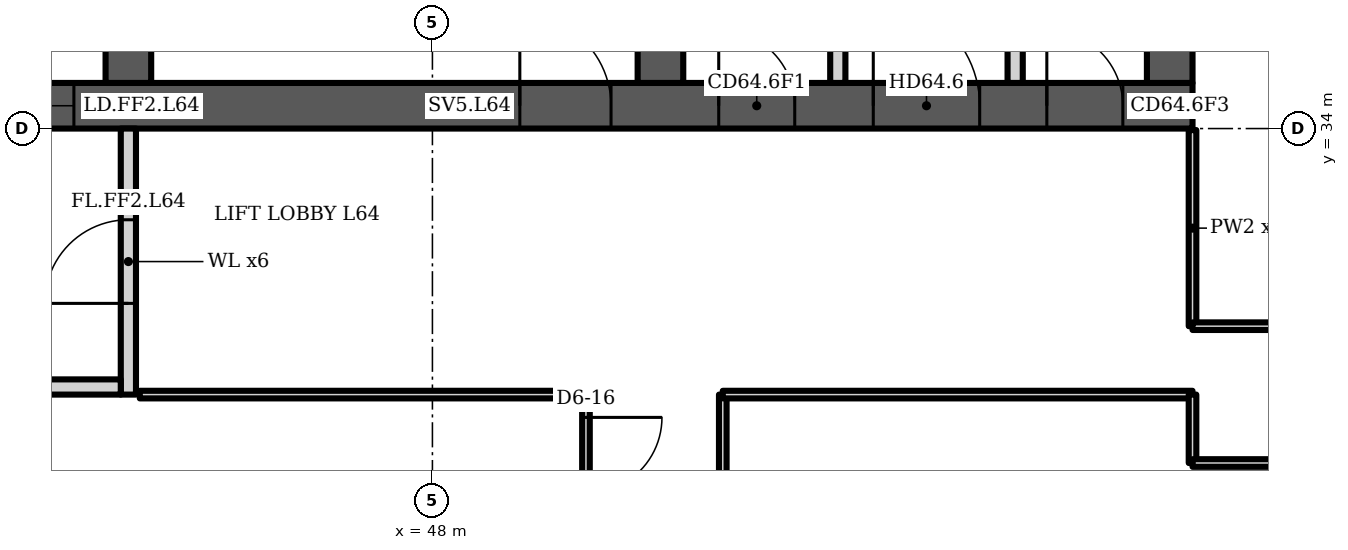
"""IFC4 building model, lengths in metres.
Left out: names, types, materials, properties, quantities, classifications, styles, units other than length and angle.
Written with IfcOpenShell. Run it as: python <this file> out.ifc"""

import sys

from ifc_helpers import new_model, si_unit, direction, frame, frame_2d, origin, place, context, subcontext, project, spatial, polyline, rectangle, outline, extrude, element, fill, save


model = new_model("IFC4")
c1 = context("Model", 3, precision=1e-05, world=origin(), true_north=direction((0.0, 1.0)))
c2 = subcontext(c1, "Body", "Model", "MODEL_VIEW")
j1 = project(units=[si_unit("LENGTHUNIT", "METRE"), si_unit("PLANEANGLEUNIT", "RADIAN")], contexts=[c1])
p1 = place(None, origin())
s1 = spatial("IfcSite", under=j1, at=p1, CompositionType="ELEMENT")
p2 = place(p1, origin())
s2 = spatial("IfcBuilding", under=s1, at=p2, CompositionType="ELEMENT")
p3 = place(p2, frame((0.0, 0.0, 253.9)))
s3 = spatial("IfcBuildingStorey", under=s2, at=p3, CompositionType="ELEMENT", Elevation=253.9)
p4 = place(p3, frame((23.0, 34.3, 0.0), z_axis=(0.0, 0.0, 1.0), x_axis=(1.0, 0.0, 0.0)))
e1 = element("IfcWall", 1, at=p4, inside=s3, PredefinedType="SHEAR", context=c2, shape_type="SweptSolid", body=[
    extrude(rectangle(XDim=35.0, YDim=0.6, at=frame_2d((17.5, 0.0))), origin(), (0.0, 0.0, 1.0), 3.6),
])
p5 = place(p4, frame((0.65, 0.0, 0.0)))
e2 = element("IfcOpeningElement", 2, at=p5, cuts=e1, PredefinedType="OPENING", context=c2, shape_type="SweptSolid", body=[
    extrude(rectangle(XDim=1.2, YDim=2.1, at=frame_2d((0.6, 1.05))), frame((0.0, 0.31, 0.0), z_axis=(0.0, -1.0, 0.0), x_axis=(1.0, 0.0, 0.0)), (0.0, 0.0, 1.0), 0.62),
])
p6 = place(p4, frame((7.717, 0.0, 0.0)))
e3 = element("IfcOpeningElement", 3, at=p6, cuts=e1, PredefinedType="OPENING", context=c2, shape_type="SweptSolid", body=[
    extrude(rectangle(XDim=1.1, YDim=2.1, at=frame_2d((0.55, 1.05))), frame((0.0, 0.31, 0.0), z_axis=(0.0, -1.0, 0.0), x_axis=(1.0, 0.0, 0.0)), (0.0, 0.0, 1.0), 0.62),
])
p7 = place(p4, frame((12.183, 0.0, 0.0)))
e4 = element("IfcOpeningElement", 4, at=p7, cuts=e1, PredefinedType="OPENING", context=c2, shape_type="SweptSolid", body=[
    extrude(rectangle(XDim=1.1, YDim=2.1, at=frame_2d((0.55, 1.05))), frame((0.0, 0.31, 0.0), z_axis=(0.0, -1.0, 0.0), x_axis=(1.0, 0.0, 0.0)), (0.0, 0.0, 1.0), 0.62),
])
p8 = place(p4, frame((9.8, 0.0, 0.0)))
e5 = element("IfcOpeningElement", 5, at=p8, cuts=e1, PredefinedType="OPENING", context=c2, shape_type="SweptSolid", body=[
    extrude(rectangle(XDim=1.4, YDim=2.1, at=frame_2d((0.7, 1.05))), frame((0.0, 0.31, 0.0), z_axis=(0.0, -1.0, 0.0), x_axis=(1.0, 0.0, 0.0)), (0.0, 0.0, 1.0), 0.62),
])
p9 = place(p4, frame((14.717, 0.0, 0.0)))
e6 = element("IfcOpeningElement", 6, at=p9, cuts=e1, PredefinedType="OPENING", context=c2, shape_type="SweptSolid", body=[
    extrude(rectangle(XDim=1.1, YDim=2.1, at=frame_2d((0.55, 1.05))), frame((0.0, 0.31, 0.0), z_axis=(0.0, -1.0, 0.0), x_axis=(1.0, 0.0, 0.0)), (0.0, 0.0, 1.0), 0.62),
])
p10 = place(p4, frame((16.95, 0.0, 0.0)))
e7 = element("IfcOpeningElement", 7, at=p10, cuts=e1, PredefinedType="OPENING", context=c2, shape_type="SweptSolid", body=[
    extrude(rectangle(XDim=1.1, YDim=2.1, at=frame_2d((0.55, 1.05))), frame((0.0, 0.31, 0.0), z_axis=(0.0, -1.0, 0.0), x_axis=(1.0, 0.0, 0.0)), (0.0, 0.0, 1.0), 0.62),
])
p11 = place(p4, frame((19.183, 0.0, 0.0)))
e8 = element("IfcOpeningElement", 8, at=p11, cuts=e1, PredefinedType="OPENING", context=c2, shape_type="SweptSolid", body=[
    extrude(rectangle(XDim=1.1, YDim=2.1, at=frame_2d((0.55, 1.05))), frame((0.0, 0.31, 0.0), z_axis=(0.0, -1.0, 0.0), x_axis=(1.0, 0.0, 0.0)), (0.0, 0.0, 1.0), 0.62),
])
p12 = place(p4, frame((26.15, 0.0, 0.0)))
e9 = element("IfcOpeningElement", 9, at=p12, cuts=e1, PredefinedType="OPENING", context=c2, shape_type="SweptSolid", body=[
    extrude(rectangle(XDim=1.2, YDim=2.1, at=frame_2d((0.6, 1.05))), frame((0.0, 0.31, 0.0), z_axis=(0.0, -1.0, 0.0), x_axis=(1.0, 0.0, 0.0)), (0.0, 0.0, 1.0), 0.62),
])
p13 = place(p4, frame((28.767, 0.0, 0.0)))
e10 = element("IfcOpeningElement", 10, at=p13, cuts=e1, PredefinedType="OPENING", context=c2, shape_type="SweptSolid", body=[
    extrude(rectangle(XDim=1.0, YDim=2.1, at=frame_2d((0.5, 1.05))), frame((0.0, 0.31, 0.0), z_axis=(0.0, -1.0, 0.0), x_axis=(1.0, 0.0, 0.0)), (0.0, 0.0, 1.0), 0.62),
])
p14 = place(p4, frame((33.083, 0.0, 0.0)))
e11 = element("IfcOpeningElement", 11, at=p14, cuts=e1, PredefinedType="OPENING", context=c2, shape_type="SweptSolid", body=[
    extrude(rectangle(XDim=1.0, YDim=2.1, at=frame_2d((0.5, 1.05))), frame((0.0, 0.31, 0.0), z_axis=(0.0, -1.0, 0.0), x_axis=(1.0, 0.0, 0.0)), (0.0, 0.0, 1.0), 0.62),
])
p15 = place(p4, frame((30.8, 0.0, 0.0)))
e12 = element("IfcOpeningElement", 12, at=p15, cuts=e1, PredefinedType="OPENING", context=c2, shape_type="SweptSolid", body=[
    extrude(rectangle(XDim=1.4, YDim=2.1, at=frame_2d((0.7, 1.05))), frame((0.0, 0.31, 0.0), z_axis=(0.0, -1.0, 0.0), x_axis=(1.0, 0.0, 0.0)), (0.0, 0.0, 1.0), 0.62),
])
p16 = place(p3, frame((44.0, 34.6, 0.0), z_axis=(0.0, 0.0, 1.0), x_axis=(0.0, 1.0, 0.0)))
e13 = element("IfcWall", 13, at=p16, inside=s3, PredefinedType="SHEAR", context=c2, shape_type="SweptSolid", body=[
    extrude(rectangle(XDim=14.784, YDim=0.6, at=frame_2d((7.392, 0.0))), origin(), (0.0, 0.0, 1.0), 3.6),
])
p17 = place(p16, frame((11.608, 0.0, 0.0)))
e14 = element("IfcOpeningElement", 14, at=p17, cuts=e13, PredefinedType="OPENING", context=c2, shape_type="SweptSolid", body=[
    extrude(rectangle(XDim=1.0, YDim=2.1, at=frame_2d((0.5, 1.05))), frame((0.0, 0.31, 0.0), z_axis=(0.0, -1.0, 0.0), x_axis=(1.0, 0.0, 0.0)), (0.0, 0.0, 1.0), 0.62),
])
p18 = place(p16, frame((3.8, 0.0, 0.0)))
e15 = element("IfcOpeningElement", 15, at=p18, cuts=e13, PredefinedType="OPENING", context=c2, shape_type="SweptSolid", body=[
    extrude(rectangle(XDim=1.1, YDim=2.1, at=frame_2d((0.55, 1.05))), frame((0.0, 0.31, 0.0), z_axis=(0.0, -1.0, 0.0), x_axis=(1.0, 0.0, 0.0)), (0.0, 0.0, 1.0), 0.62),
])
p19 = place(p3, frame((51.0, 34.6, 0.0), z_axis=(0.0, 0.0, 1.0), x_axis=(0.0, 1.0, 0.0)))
e16 = element("IfcWall", 16, at=p19, inside=s3, PredefinedType="SHEAR", context=c2, shape_type="SweptSolid", body=[
    extrude(rectangle(XDim=14.171, YDim=0.6, at=frame_2d((7.085, 0.0))), origin(), (0.0, 0.0, 1.0), 3.6),
])
p20 = place(p19, frame((3.8, 0.0, 0.0)))
e17 = element("IfcOpeningElement", 17, at=p20, cuts=e16, PredefinedType="OPENING", context=c2, shape_type="SweptSolid", body=[
    extrude(rectangle(XDim=1.1, YDim=2.1, at=frame_2d((0.55, 1.05))), frame((0.0, 0.31, 0.0), z_axis=(0.0, -1.0, 0.0), x_axis=(1.0, 0.0, 0.0)), (0.0, 0.0, 1.0), 0.62),
])
p21 = place(p3, frame((57.7, 34.6, 0.0), z_axis=(0.0, 0.0, 1.0), x_axis=(0.0, 1.0, 0.0)))
e18 = element("IfcWall", 18, at=p21, inside=s3, PredefinedType="SHEAR", context=c2, shape_type="SweptSolid", body=[
    extrude(rectangle(XDim=13.585, YDim=0.6, at=frame_2d((6.792, 0.0))), origin(), (0.0, 0.0, 1.0), 3.6),
])
p22 = place(p3, origin())
e19 = element("IfcWall", 19, at=p22, inside=s3, PredefinedType="PARTITIONING", context=c2, shape_type="SweptSolid", body=[
    extrude(outline(polyline([(41.567, 37.1), (39.433, 37.1), (39.433, 34.6), (39.233, 34.6), (39.233, 37.45), (37.3, 37.45), (37.3, 37.65), (39.233, 37.65), (39.433, 37.65), (39.433, 37.3), (41.567, 37.3), (41.567, 37.35), (41.767, 37.35), (43.7, 37.35), (43.7, 37.15), (41.767, 37.15), (41.767, 34.6), (41.567, 34.6), (41.567, 37.1)])), origin(), (0.0, 0.0, 1.0), 3.2),
])
p23 = place(p3, origin())
e20 = element("IfcWall", 20, at=p23, inside=s3, PredefinedType="PARTITIONING", context=c2, shape_type="SweptSolid", body=[
    extrude(outline(polyline([(53.233, 34.6), (53.233, 37.3), (53.433, 37.3), (53.433, 34.6), (53.233, 34.6)])), origin(), (0.0, 0.0, 1.0), 3.2),
])
p24 = place(p3, origin())
e21 = element("IfcWall", 21, at=p24, inside=s3, PredefinedType="PARTITIONING", context=c2, shape_type="SweptSolid", body=[
    extrude(outline(polyline([(55.567, 34.6), (55.567, 37.3), (55.767, 37.3), (55.767, 34.6), (55.567, 34.6)])), origin(), (0.0, 0.0, 1.0), 3.2),
])
p25 = place(p3, frame((44.0, 30.5, 0.0), z_axis=(0.0, 0.0, 1.0), x_axis=(0.0, 1.0, 0.0)))
e22 = element("IfcWall", 22, at=p25, inside=s3, PredefinedType="PARTITIONING", context=c2, shape_type="SweptSolid", body=[
    extrude(rectangle(XDim=3.5, YDim=0.2, at=frame_2d((1.75, 0.0))), origin(), (0.0, 0.0, 1.0), 3.2),
])
p26 = place(p25, frame((1.2, 0.0, 0.0)))
e23 = element("IfcOpeningElement", 23, at=p26, cuts=e22, PredefinedType="OPENING", context=c2, shape_type="SweptSolid", body=[
    extrude(rectangle(XDim=1.1, YDim=2.1, at=frame_2d((0.55, 1.05))), frame((0.0, 0.11, 0.0), z_axis=(0.0, -1.0, 0.0), x_axis=(1.0, 0.0, 0.0)), (0.0, 0.0, 1.0), 0.22),
])
p27 = place(p3, frame((41.1, 30.6, 0.0), z_axis=(0.0, 0.0, 1.0), x_axis=(1.0, 0.0, 0.0)))
e24 = element("IfcWall", 24, at=p27, inside=s3, PredefinedType="PARTITIONING", context=c2, shape_type="SweptSolid", body=[
    extrude(rectangle(XDim=2.8, YDim=0.2, at=frame_2d((1.4, 0.0))), origin(), (0.0, 0.0, 1.0), 3.2),
])
p28 = place(p3, frame((50.02, 15.245, 0.0), z_axis=(0.0, 0.0, 1.0), x_axis=(0.0, 1.0, 0.0)))
e25 = element("IfcWall", 25, at=p28, inside=s3, PredefinedType="PARTITIONING", context=c2, shape_type="SweptSolid", body=[
    extrude(rectangle(XDim=15.255, YDim=0.1, at=frame_2d((7.627, 0.0))), origin(), (0.0, 0.0, 1.0), 3.2),
])
p29 = place(p28, frame((13.955, 0.0, 0.0)))
e26 = element("IfcOpeningElement", 26, at=p29, cuts=e25, PredefinedType="OPENING", context=c2, shape_type="SweptSolid", body=[
    extrude(rectangle(XDim=1.0, YDim=2.1, at=frame_2d((0.5, 1.05))), frame((0.0, 0.06, 0.0), z_axis=(0.0, -1.0, 0.0), x_axis=(1.0, 0.0, 0.0)), (0.0, 0.0, 1.0), 0.12),
])
p30 = place(p3, frame((51.82, 3.717, 0.0), z_axis=(0.0, 0.0, 1.0), x_axis=(0.0, 1.0, 0.0)))
e27 = element("IfcWall", 27, at=p30, inside=s3, PredefinedType="PARTITIONING", context=c2, shape_type="SweptSolid", body=[
    extrude(rectangle(XDim=26.783, YDim=0.1, at=frame_2d((13.391, 0.0))), origin(), (0.0, 0.0, 1.0), 2.58),
])
p31 = place(p30, frame((2.798, 0.0, 0.0)))
e28 = element("IfcOpeningElement", 28, at=p31, cuts=e27, PredefinedType="OPENING", context=c2, shape_type="SweptSolid", body=[
    extrude(rectangle(XDim=1.0, YDim=2.1, at=frame_2d((0.5, 1.05))), frame((0.0, 0.06, 0.0), z_axis=(0.0, -1.0, 0.0), x_axis=(1.0, 0.0, 0.0)), (0.0, 0.0, 1.0), 0.12),
])
p32 = place(p30, frame((9.453, 0.0, 0.0)))
e29 = element("IfcOpeningElement", 29, at=p32, cuts=e27, PredefinedType="OPENING", context=c2, shape_type="SweptSolid", body=[
    extrude(rectangle(XDim=1.0, YDim=2.1, at=frame_2d((0.5, 1.05))), frame((0.0, 0.06, 0.0), z_axis=(0.0, -1.0, 0.0), x_axis=(1.0, 0.0, 0.0)), (0.0, 0.0, 1.0), 0.12),
])
p33 = place(p3, frame((51.82, 30.5, 0.0), z_axis=(0.0, 0.0, 1.0), x_axis=(1.0, 0.0, 0.0)))
e30 = element("IfcWall", 30, at=p33, inside=s3, PredefinedType="PARTITIONING", context=c2, shape_type="SweptSolid", body=[
    extrude(rectangle(XDim=6.18, YDim=0.1, at=frame_2d((3.09, 0.0))), origin(), (0.0, 0.0, 1.0), 3.2),
])
p34 = place(p3, frame((58.0, 29.6, 0.0), z_axis=(0.0, 0.0, 1.0), x_axis=(0.0, 1.0, 0.0)))
e31 = element("IfcWall", 31, at=p34, inside=s3, PredefinedType="PARTITIONING", context=c2, shape_type="SweptSolid", body=[
    extrude(rectangle(XDim=0.9, YDim=0.1, at=frame_2d((0.45, 0.0))), origin(), (0.0, 0.0, 1.0), 3.2),
])
p35 = place(p3, frame((58.0, 29.6, 0.0), z_axis=(0.0, 0.0, 1.0), x_axis=(1.0, 0.0, 0.0)))
e32 = element("IfcWall", 32, at=p35, inside=s3, PredefinedType="PARTITIONING", context=c2, shape_type="SweptSolid", body=[
    extrude(rectangle(XDim=6.17, YDim=0.1, at=frame_2d((3.085, 0.0))), origin(), (0.0, 0.0, 1.0), 3.2),
])
p36 = place(p3, frame((58.0, 31.4, 0.0), z_axis=(0.0, 0.0, 1.0), x_axis=(0.0, 1.0, 0.0)))
e33 = element("IfcWall", 33, at=p36, inside=s3, PredefinedType="PARTITIONING", context=c2, shape_type="SweptSolid", body=[
    extrude(rectangle(XDim=2.58, YDim=0.1, at=frame_2d((1.29, 0.0))), origin(), (0.0, 0.0, 1.0), 3.2),
])
p37 = place(p3, frame((58.0, 31.4, 0.0), z_axis=(0.0, 0.0, 1.0), x_axis=(1.0, 0.0, 0.0)))
e34 = element("IfcWall", 34, at=p37, inside=s3, PredefinedType="PARTITIONING", context=c2, shape_type="SweptSolid", body=[
    extrude(rectangle(XDim=7.97, YDim=0.1, at=frame_2d((3.985, 0.0))), origin(), (0.0, 0.0, 1.0), 3.2),
])
p38 = place(p37, frame((2.15, 0.0, 0.0)))
e35 = element("IfcOpeningElement", 35, at=p38, cuts=e34, PredefinedType="OPENING", context=c2, shape_type="SweptSolid", body=[
    extrude(rectangle(XDim=1.0, YDim=2.1, at=frame_2d((0.5, 1.05))), frame((0.0, 0.06, 0.0), z_axis=(0.0, -1.0, 0.0), x_axis=(1.0, 0.0, 0.0)), (0.0, 0.0, 1.0), 0.12),
])
p39 = place(p3, frame((44.15, 30.5, 0.0), z_axis=(0.0, 0.0, 1.0), x_axis=(1.0, 0.0, 0.0)))
e36 = element("IfcWall", 36, at=p39, inside=s3, PredefinedType="PARTITIONING", context=c2, shape_type="SweptSolid", body=[
    extrude(rectangle(XDim=5.87, YDim=0.1, at=frame_2d((2.935, 0.0))), origin(), (0.0, 0.0, 1.0), 3.2),
])
p40 = place(p11, origin())
e37 = element("IfcDoor", 37, at=p40, inside=s3, OperationType="DOUBLE_DOOR_SLIDING", PredefinedType="DOOR", context=c2, shape_type="SweptSolid", body=[
    extrude(rectangle(XDim=1.1, YDim=2.1, at=frame_2d((0.55, 1.05))), frame((0.0, 0.025, 0.0), z_axis=(0.0, -1.0, 0.0), x_axis=(1.0, 0.0, 0.0)), (0.0, 0.0, 1.0), 0.05),
])
fill(e8, e37)
p41 = place(p12, origin())
e38 = element("IfcDoor", 38, at=p41, inside=s3, OperationType="SINGLE_SWING_LEFT", PredefinedType="DOOR", context=c2, shape_type="SweptSolid", body=[
    extrude(rectangle(XDim=1.2, YDim=2.1, at=frame_2d((0.6, 1.05))), frame((0.0, 0.025, 0.0), z_axis=(0.0, -1.0, 0.0), x_axis=(1.0, 0.0, 0.0)), (0.0, 0.0, 1.0), 0.05),
])
fill(e9, e38)
p42 = place(p13, origin())
e39 = element("IfcDoor", 39, at=p42, inside=s3, OperationType="SINGLE_SWING_LEFT", PredefinedType="DOOR", context=c2, shape_type="SweptSolid", body=[
    extrude(rectangle(XDim=1.0, YDim=2.1, at=frame_2d((0.5, 1.05))), frame((0.0, 0.025, 0.0), z_axis=(0.0, -1.0, 0.0), x_axis=(1.0, 0.0, 0.0)), (0.0, 0.0, 1.0), 0.05),
])
fill(e10, e39)
p43 = place(p14, origin())
e40 = element("IfcDoor", 40, at=p43, inside=s3, OperationType="SINGLE_SWING_LEFT", PredefinedType="DOOR", context=c2, shape_type="SweptSolid", body=[
    extrude(rectangle(XDim=1.0, YDim=2.1, at=frame_2d((0.5, 1.05))), frame((0.0, 0.025, 0.0), z_axis=(0.0, -1.0, 0.0), x_axis=(1.0, 0.0, 0.0)), (0.0, 0.0, 1.0), 0.05),
])
fill(e11, e40)
p44 = place(p15, origin())
e41 = element("IfcDoor", 41, at=p44, inside=s3, OperationType="DOUBLE_DOOR_SINGLE_SWING", PredefinedType="DOOR", context=c2, shape_type="SweptSolid", body=[
    extrude(rectangle(XDim=1.4, YDim=2.1, at=frame_2d((0.7, 1.05))), frame((0.0, 0.025, 0.0), z_axis=(0.0, -1.0, 0.0), x_axis=(1.0, 0.0, 0.0)), (0.0, 0.0, 1.0), 0.05),
])
fill(e12, e41)
p45 = place(p26, origin())
e42 = element("IfcDoor", 42, at=p45, inside=s3, OperationType="SINGLE_SWING_LEFT", PredefinedType="DOOR", context=c2, shape_type="SweptSolid", body=[
    extrude(rectangle(XDim=1.1, YDim=2.1, at=frame_2d((0.55, 1.05))), frame((0.0, 0.025, 0.0), z_axis=(0.0, -1.0, 0.0), x_axis=(1.0, 0.0, 0.0)), (0.0, 0.0, 1.0), 0.05),
])
fill(e23, e42)
p46 = place(p29, origin())
e43 = element("IfcDoor", 43, at=p46, inside=s3, OperationType="SINGLE_SWING_RIGHT", PredefinedType="DOOR", context=c2, shape_type="SweptSolid", body=[
    extrude(rectangle(XDim=1.0, YDim=2.1, at=frame_2d((0.5, 1.05))), frame((0.0, 0.025, 0.0), z_axis=(0.0, -1.0, 0.0), x_axis=(1.0, 0.0, 0.0)), (0.0, 0.0, 1.0), 0.05),
])
fill(e26, e43)
save(model, sys.argv[1])
